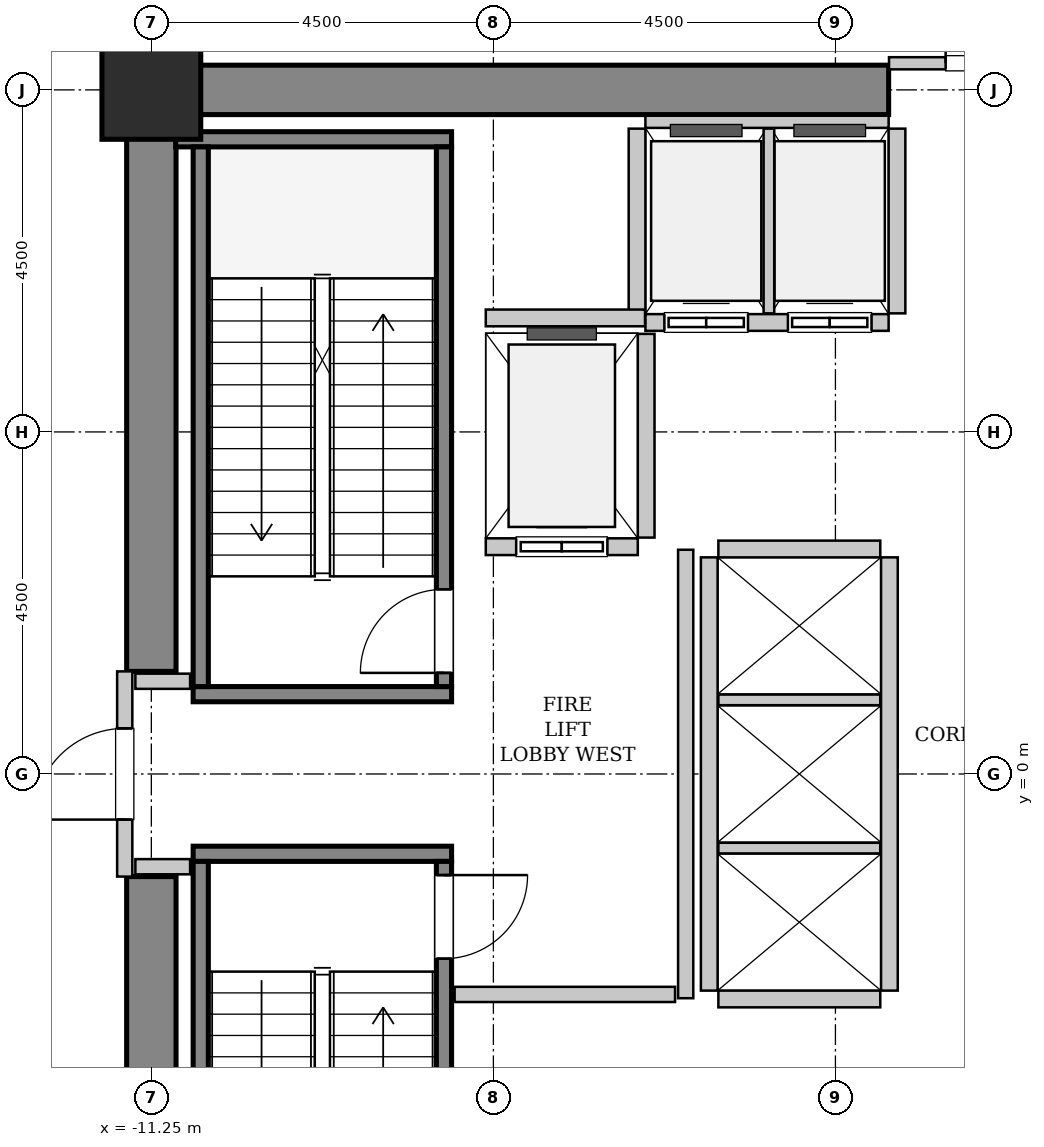
"""IFC4 building model, lengths in metres.
Left out: names, types, materials, properties, quantities, classifications, styles, units other than length and angle.
Written with IfcOpenShell. Run it as: python <this file> out.ifc"""

import sys

from ifc_helpers import new_model, si_unit, direction, frame, frame_2d, origin, origin_2d, place, context, subcontext, project, spatial, rectangle, hollow_rectangle, extrude, source, transform, mapped, element, fill, save


model = new_model("IFC4")
c1 = context("Model", 3, precision=1e-05, world=origin(), true_north=direction((0.0, 1.0)))
c2 = subcontext(c1, "Body", "Model", "MODEL_VIEW")
j1 = project(units=[si_unit("LENGTHUNIT", "METRE"), si_unit("PLANEANGLEUNIT", "RADIAN")], contexts=[c1])
p1 = place(None, origin())
s1 = spatial("IfcSite", under=j1, at=p1, CompositionType="ELEMENT")
p2 = place(p1, origin())
s2 = spatial("IfcBuilding", under=s1, at=p2, CompositionType="ELEMENT")
p3 = place(p2, frame((0.0, 0.0, 6.0)))
s3 = spatial("IfcBuildingStorey", under=s2, at=p3, CompositionType="ELEMENT", Elevation=6.0)
m1 = source(origin(), c2, "Body", "SweptSolid", [
    extrude(rectangle(XDim=10.025, YDim=0.65, at=frame_2d((5.012, 0.0))), origin(), (0.0, 0.0, 1.0), 5.4),
])
p4 = place(p3, frame((-11.575, 9.0, 0.0), z_axis=(0.0, 0.0, 1.0), x_axis=(1.0, 0.0, 0.0)))
e1 = element("IfcWall", 1, at=p4, inside=s3, PredefinedType="SHEAR", context=c2, shape_type="MappedRepresentation", body=[
    mapped(m1, transform((0.0, 0.0, 0.0), x_axis=(1.0, 0.0, 0.0), y_axis=(0.0, 1.0, 0.0), z_axis=(0.0, 0.0, 1.0), scale=1.0)),
])
m2 = source(origin(), c2, "Body", "SweptSolid", [
    extrude(rectangle(XDim=7.325, YDim=0.65, at=frame_2d((3.663, 0.0))), origin(), (0.0, 0.0, 1.0), 5.4),
])
for number, where, z_axis, x_axis in (
    (2, (-11.25, -8.675, 0.0), (0.0, 0.0, 1.0), (0.0, 1.0, 0.0)),
    (3, (-11.25, 1.35, 0.0), (0.0, 0.0, 1.0), (0.0, 1.0, 0.0)),
):
    element("IfcWall", number, at=place(p3, frame(where, z_axis=z_axis, x_axis=x_axis)), inside=s3, PredefinedType="SHEAR", context=c2, shape_type="MappedRepresentation", body=[
        mapped(m2, transform((0.0, 0.0, 0.0), x_axis=(1.0, 0.0, 0.0), y_axis=(0.0, 1.0, 0.0), z_axis=(0.0, 0.0, 1.0), scale=1.0)),
    ])
m3 = source(origin(), c2, "Body", "SweptSolid", [
    extrude(hollow_rectangle(XDim=1.3, YDim=1.3, WallThickness=0.065, InnerFilletRadius=0.065, OuterFilletRadius=0.13, at=origin_2d()), origin(), (0.0, 0.0, 1.0), 5.4),
])
p5 = place(p3, frame((-11.25, 9.0, 0.0), z_axis=(0.0, 0.0, 1.0), x_axis=(1.0, 0.0, 0.0)))
e4 = element("IfcColumn", 4, at=p5, inside=s3, PredefinedType="COLUMN", context=c2, shape_type="MappedRepresentation", body=[
    mapped(m3, transform((0.0, 0.0, 0.0), x_axis=(1.0, 0.0, 0.0), y_axis=(0.0, 1.0, 0.0), z_axis=(0.0, 0.0, 1.0), scale=1.0)),
])
m4 = source(origin(), c2, "Body", "SweptSolid", [
    extrude(rectangle(XDim=3.4, YDim=0.2, at=frame_2d((1.7, 0.0))), origin(), (0.0, 0.0, 1.0), 5.4),
])
p6 = place(p3, frame((-7.3, 1.05, 0.0), z_axis=(0.0, 0.0, 1.0), x_axis=(-1.0, 0.0, 0.0)))
e5 = element("IfcWall", 5, at=p6, inside=s3, PredefinedType="SOLIDWALL", context=c2, shape_type="MappedRepresentation", body=[
    mapped(m4, transform((0.0, 0.0, 0.0), x_axis=(1.0, 0.0, 0.0), y_axis=(0.0, 1.0, 0.0), z_axis=(0.0, 0.0, 1.0), scale=1.0)),
])
m5 = source(origin(), c2, "Body", "SweptSolid", [
    extrude(rectangle(XDim=3.63, YDim=0.2, at=frame_2d((1.815, 0.0))), origin(), (0.0, 0.0, 1.0), 5.4),
])
p7 = place(p3, frame((-7.3, 8.35, 0.0), z_axis=(0.0, 0.0, 1.0), x_axis=(-1.0, 0.0, 0.0)))
e6 = element("IfcWall", 6, at=p7, inside=s3, PredefinedType="SOLIDWALL", context=c2, shape_type="MappedRepresentation", body=[
    mapped(m5, transform((0.0, 0.0, 0.0), x_axis=(1.0, 0.0, 0.0), y_axis=(0.0, 1.0, 0.0), z_axis=(0.0, 0.0, 1.0), scale=1.0)),
])
m6 = source(origin(), c2, "Body", "SweptSolid", [
    extrude(rectangle(XDim=7.1, YDim=0.2, at=frame_2d((3.55, 0.0))), origin(), (0.0, 0.0, 1.0), 5.4),
])
p8 = place(p3, frame((-7.4, 1.15, 0.0), z_axis=(0.0, 0.0, 1.0), x_axis=(0.0, 1.0, 0.0)))
e7 = element("IfcWall", 7, at=p8, inside=s3, PredefinedType="SOLIDWALL", context=c2, shape_type="MappedRepresentation", body=[
    mapped(m6, transform((0.0, 0.0, 0.0), x_axis=(1.0, 0.0, 0.0), y_axis=(0.0, 1.0, 0.0), z_axis=(0.0, 0.0, 1.0), scale=1.0)),
])
p9 = place(p8, frame((0.18, 0.0, 0.0)))
e8 = element("IfcOpeningElement", 8, at=p9, cuts=e7, PredefinedType="OPENING", context=c2, shape_type="SweptSolid", body=[
    extrude(rectangle(XDim=1.1, YDim=2.15, at=frame_2d((0.55, 1.075))), frame((0.0, 0.11, 0.0), z_axis=(0.0, -1.0, 0.0), x_axis=(1.0, 0.0, 0.0)), (0.0, 0.0, 1.0), 0.22),
])
p10 = place(p3, frame((-10.6, 1.15, 0.0), z_axis=(0.0, 0.0, 1.0), x_axis=(0.0, 1.0, 0.0)))
e9 = element("IfcWall", 9, at=p10, inside=s3, PredefinedType="SOLIDWALL", context=c2, shape_type="MappedRepresentation", body=[
    mapped(m6, transform((0.0, 0.0, 0.0), x_axis=(1.0, 0.0, 0.0), y_axis=(0.0, 1.0, 0.0), z_axis=(0.0, 0.0, 1.0), scale=1.0)),
])
p11 = place(p3, frame((-10.7, -1.05, 0.0), z_axis=(0.0, 0.0, 1.0), x_axis=(1.0, 0.0, 0.0)))
e10 = element("IfcWall", 10, at=p11, inside=s3, PredefinedType="SOLIDWALL", context=c2, shape_type="MappedRepresentation", body=[
    mapped(m4, transform((0.0, 0.0, 0.0), x_axis=(1.0, 0.0, 0.0), y_axis=(0.0, 1.0, 0.0), z_axis=(0.0, 0.0, 1.0), scale=1.0)),
])
p12 = place(p3, frame((-10.6, -1.15, 0.0), z_axis=(0.0, 0.0, 1.0), x_axis=(0.0, -1.0, 0.0)))
e11 = element("IfcWall", 11, at=p12, inside=s3, PredefinedType="SOLIDWALL", context=c2, shape_type="MappedRepresentation", body=[
    mapped(m6, transform((0.0, 0.0, 0.0), x_axis=(1.0, 0.0, 0.0), y_axis=(0.0, 1.0, 0.0), z_axis=(0.0, 0.0, 1.0), scale=1.0)),
])
p13 = place(p3, frame((-7.4, -1.15, 0.0), z_axis=(0.0, 0.0, 1.0), x_axis=(0.0, -1.0, 0.0)))
e12 = element("IfcWall", 12, at=p13, inside=s3, PredefinedType="SOLIDWALL", context=c2, shape_type="MappedRepresentation", body=[
    mapped(m6, transform((0.0, 0.0, 0.0), x_axis=(1.0, 0.0, 0.0), y_axis=(0.0, 1.0, 0.0), z_axis=(0.0, 0.0, 1.0), scale=1.0)),
])
p14 = place(p13, frame((0.18, 0.0, 0.0)))
e13 = element("IfcOpeningElement", 13, at=p14, cuts=e12, PredefinedType="OPENING", context=c2, shape_type="SweptSolid", body=[
    extrude(rectangle(XDim=1.1, YDim=2.15, at=frame_2d((0.55, 1.075))), frame((0.0, 0.11, 0.0), z_axis=(0.0, -1.0, 0.0), x_axis=(1.0, 0.0, 0.0)), (0.0, 0.0, 1.0), 0.22),
])
m7 = source(origin(), c2, "Body", "SweptSolid", [
    extrude(rectangle(XDim=2.0, YDim=0.22, at=frame_2d((1.0, 0.0))), origin(), (0.0, 0.0, 1.0), 5.085),
])
p15 = place(p3, frame((-6.85, 2.99, 0.0), z_axis=(0.0, 0.0, 1.0), x_axis=(1.0, 0.0, 0.0)))
e14 = element("IfcWall", 14, at=p15, inside=s3, PredefinedType="SOLIDWALL", context=c2, shape_type="MappedRepresentation", body=[
    mapped(m7, transform((0.0, 0.0, 0.0), x_axis=(1.0, 0.0, 0.0), y_axis=(0.0, 1.0, 0.0), z_axis=(0.0, 0.0, 1.0), scale=1.0)),
])
p16 = place(p15, frame((0.4, 0.0, 0.0)))
e15 = element("IfcOpeningElement", 15, at=p16, cuts=e14, PredefinedType="OPENING", context=c2, shape_type="SweptSolid", body=[
    extrude(rectangle(XDim=1.2, YDim=2.2, at=frame_2d((0.6, 1.1))), frame((0.0, 0.12, 0.0), z_axis=(0.0, -1.0, 0.0), x_axis=(1.0, 0.0, 0.0)), (0.0, 0.0, 1.0), 0.24),
])
m8 = source(origin(), c2, "Body", "SweptSolid", [
    extrude(rectangle(XDim=2.68, YDim=0.22, at=frame_2d((1.34, 0.0))), origin(), (0.0, 0.0, 1.0), 5.085),
])
p17 = place(p3, frame((-4.74, 3.11, 0.0), z_axis=(0.0, 0.0, 1.0), x_axis=(0.0, 1.0, 0.0)))
e16 = element("IfcWall", 16, at=p17, inside=s3, PredefinedType="SOLIDWALL", context=c2, shape_type="MappedRepresentation", body=[
    mapped(m8, transform((0.0, 0.0, 0.0), x_axis=(1.0, 0.0, 0.0), y_axis=(0.0, 1.0, 0.0), z_axis=(0.0, 0.0, 1.0), scale=1.0)),
])
m9 = source(origin(), c2, "Body", "SweptSolid", [
    extrude(rectangle(XDim=3.2, YDim=0.22, at=frame_2d((1.6, 0.0))), origin(), (0.0, 0.0, 1.0), 5.085),
])
p18 = place(p3, frame((-4.75, 5.94, 0.0), z_axis=(0.0, 0.0, 1.0), x_axis=(1.0, 0.0, 0.0)))
e17 = element("IfcWall", 17, at=p18, inside=s3, PredefinedType="SOLIDWALL", context=c2, shape_type="MappedRepresentation", body=[
    mapped(m9, transform((0.0, 0.0, 0.0), x_axis=(1.0, 0.0, 0.0), y_axis=(0.0, 1.0, 0.0), z_axis=(0.0, 0.0, 1.0), scale=1.0)),
])
p19 = place(p18, frame((0.25, 0.0, 0.0)))
e18 = element("IfcOpeningElement", 18, at=p19, cuts=e17, PredefinedType="OPENING", context=c2, shape_type="SweptSolid", body=[
    extrude(rectangle(XDim=1.1, YDim=2.2, at=frame_2d((0.55, 1.1))), frame((0.0, 0.12, 0.0), z_axis=(0.0, -1.0, 0.0), x_axis=(1.0, 0.0, 0.0)), (0.0, 0.0, 1.0), 0.24),
])
p20 = place(p18, frame((1.875, 0.0, 0.0)))
e19 = element("IfcOpeningElement", 19, at=p20, cuts=e17, PredefinedType="OPENING", context=c2, shape_type="SweptSolid", body=[
    extrude(rectangle(XDim=1.1, YDim=2.2, at=frame_2d((0.55, 1.1))), frame((0.0, 0.12, 0.0), z_axis=(0.0, -1.0, 0.0), x_axis=(1.0, 0.0, 0.0)), (0.0, 0.0, 1.0), 0.24),
])
m10 = source(origin(), c2, "Body", "SweptSolid", [
    extrude(rectangle(XDim=3.2, YDim=0.16, at=frame_2d((1.6, 0.0))), origin(), (0.0, 0.0, 1.0), 3.975),
])
p21 = place(p3, frame((-1.55, 8.58, 0.0), z_axis=(0.0, 0.0, 1.0), x_axis=(-1.0, 0.0, 0.0)))
e20 = element("IfcWall", 20, at=p21, inside=s3, PredefinedType="PARTITIONING", context=c2, shape_type="MappedRepresentation", body=[
    mapped(m10, transform((0.0, 0.0, 0.0), x_axis=(1.0, 0.0, 0.0), y_axis=(0.0, 1.0, 0.0), z_axis=(0.0, 0.0, 1.0), scale=1.0)),
])
m11 = source(origin(), c2, "Body", "SweptSolid", [
    extrude(rectangle(XDim=2.43, YDim=0.22, at=frame_2d((1.215, 0.0))), origin(), (0.0, 0.0, 1.0), 5.085),
])
p22 = place(p3, frame((-4.86, 8.49, 0.0), z_axis=(0.0, 0.0, 1.0), x_axis=(0.0, -1.0, 0.0)))
e21 = element("IfcWall", 21, at=p22, inside=s3, PredefinedType="SOLIDWALL", context=c2, shape_type="MappedRepresentation", body=[
    mapped(m11, transform((0.0, 0.0, 0.0), x_axis=(1.0, 0.0, 0.0), y_axis=(0.0, 1.0, 0.0), z_axis=(0.0, 0.0, 1.0), scale=1.0)),
])
m12 = source(origin(), c2, "Body", "SweptSolid", [
    extrude(rectangle(XDim=2.43, YDim=0.14, at=frame_2d((1.215, 0.0))), origin(), (0.0, 0.0, 1.0), 5.085),
])
p23 = place(p3, frame((-3.125, 6.06, 0.0), z_axis=(0.0, 0.0, 1.0), x_axis=(0.0, 1.0, 0.0)))
e22 = element("IfcWall", 22, at=p23, inside=s3, PredefinedType="PARTITIONING", context=c2, shape_type="MappedRepresentation", body=[
    mapped(m12, transform((0.0, 0.0, 0.0), x_axis=(1.0, 0.0, 0.0), y_axis=(0.0, 1.0, 0.0), z_axis=(0.0, 0.0, 1.0), scale=1.0)),
])
p24 = place(p3, frame((-1.44, 6.06, 0.0), z_axis=(0.0, 0.0, 1.0), x_axis=(0.0, 1.0, 0.0)))
e23 = element("IfcWall", 23, at=p24, inside=s3, PredefinedType="SOLIDWALL", context=c2, shape_type="MappedRepresentation", body=[
    mapped(m11, transform((0.0, 0.0, 0.0), x_axis=(1.0, 0.0, 0.0), y_axis=(0.0, 1.0, 0.0), z_axis=(0.0, 0.0, 1.0), scale=1.0)),
])
m13 = source(origin(), c2, "Body", "SweptSolid", [
    extrude(rectangle(XDim=5.7, YDim=0.22, at=frame_2d((2.85, 0.0))), origin(), (0.0, 0.0, 1.0), 5.085),
])
for number, where, z_axis, x_axis in (
    (24, (-1.54, -2.85, 0.0), (0.0, 0.0, 1.0), (0.0, 1.0, 0.0)),
    (25, (-3.91, 2.85, 0.0), (0.0, 0.0, 1.0), (0.0, -1.0, 0.0)),
):
    element("IfcWall", number, at=place(p3, frame(where, z_axis=z_axis, x_axis=x_axis)), inside=s3, PredefinedType="SOLIDWALL", context=c2, shape_type="MappedRepresentation", body=[
        mapped(m13, transform((0.0, 0.0, 0.0), x_axis=(1.0, 0.0, 0.0), y_axis=(0.0, 1.0, 0.0), z_axis=(0.0, 0.0, 1.0), scale=1.0)),
    ])
m14 = source(origin(), c2, "Body", "SweptSolid", [
    extrude(rectangle(XDim=2.13, YDim=0.22, at=frame_2d((1.065, 0.0))), origin(), (0.0, 0.0, 1.0), 5.085),
])
p25 = place(p3, frame((-3.79, -2.96, 0.0), z_axis=(0.0, 0.0, 1.0), x_axis=(1.0, 0.0, 0.0)))
e26 = element("IfcWall", 26, at=p25, inside=s3, PredefinedType="SOLIDWALL", context=c2, shape_type="MappedRepresentation", body=[
    mapped(m14, transform((0.0, 0.0, 0.0), x_axis=(1.0, 0.0, 0.0), y_axis=(0.0, 1.0, 0.0), z_axis=(0.0, 0.0, 1.0), scale=1.0)),
])
m15 = source(origin(), c2, "Body", "SweptSolid", [
    extrude(rectangle(XDim=2.13, YDim=0.14, at=frame_2d((1.065, 0.0))), origin(), (0.0, 0.0, 1.0), 5.085),
])
for number, where, z_axis, x_axis in (
    (27, (-3.79, -0.975, 0.0), (0.0, 0.0, 1.0), (1.0, 0.0, 0.0)),
    (28, (-3.79, 0.975, 0.0), (0.0, 0.0, 1.0), (1.0, 0.0, 0.0)),
):
    element("IfcWall", number, at=place(p3, frame(where, z_axis=z_axis, x_axis=x_axis)), inside=s3, PredefinedType="PARTITIONING", context=c2, shape_type="MappedRepresentation", body=[
        mapped(m15, transform((0.0, 0.0, 0.0), x_axis=(1.0, 0.0, 0.0), y_axis=(0.0, 1.0, 0.0), z_axis=(0.0, 0.0, 1.0), scale=1.0)),
    ])
p26 = place(p3, frame((-1.66, 2.96, 0.0), z_axis=(0.0, 0.0, 1.0), x_axis=(-1.0, 0.0, 0.0)))
e29 = element("IfcWall", 29, at=p26, inside=s3, PredefinedType="SOLIDWALL", context=c2, shape_type="MappedRepresentation", body=[
    mapped(m14, transform((0.0, 0.0, 0.0), x_axis=(1.0, 0.0, 0.0), y_axis=(0.0, 1.0, 0.0), z_axis=(0.0, 0.0, 1.0), scale=1.0)),
])
m16 = source(origin(), c2, "Body", "SweptSolid", [
    extrude(rectangle(XDim=2.095, YDim=0.22, at=frame_2d((1.048, 0.0))), origin(), (0.0, 0.0, 1.0), 5.085),
])
p27 = place(p3, frame((-6.85, 6.0, 0.0), z_axis=(0.0, 0.0, 1.0), x_axis=(1.0, 0.0, 0.0)))
e30 = element("IfcWall", 30, at=p27, inside=s3, PredefinedType="SOLIDWALL", context=c2, shape_type="MappedRepresentation", body=[
    mapped(m16, transform((0.0, 0.0, 0.0), x_axis=(1.0, 0.0, 0.0), y_axis=(0.0, 1.0, 0.0), z_axis=(0.0, 0.0, 1.0), scale=1.0)),
])
m17 = source(origin(), c2, "Body", "SweptSolid", [
    extrude(rectangle(XDim=2.7, YDim=0.2, at=frame_2d((1.35, 0.0))), origin(), (0.0, 0.0, 1.0), 3.975),
])
p28 = place(p3, frame((-11.6, -1.35, 0.0), z_axis=(0.0, 0.0, 1.0), x_axis=(0.0, 1.0, 0.0)))
e31 = element("IfcWall", 31, at=p28, inside=s3, PredefinedType="PARTITIONING", context=c2, shape_type="MappedRepresentation", body=[
    mapped(m17, transform((0.0, 0.0, 0.0), x_axis=(1.0, 0.0, 0.0), y_axis=(0.0, 1.0, 0.0), z_axis=(0.0, 0.0, 1.0), scale=1.0)),
])
p29 = place(p28, frame((0.75, 0.0, 0.0)))
e32 = element("IfcOpeningElement", 32, at=p29, cuts=e31, PredefinedType="OPENING", context=c2, shape_type="SweptSolid", body=[
    extrude(rectangle(XDim=1.2, YDim=2.15, at=frame_2d((0.6, 1.075))), frame((0.0, 0.11, 0.0), z_axis=(0.0, -1.0, 0.0), x_axis=(1.0, 0.0, 0.0)), (0.0, 0.0, 1.0), 0.22),
])
m18 = source(origin(), c2, "Body", "SweptSolid", [
    extrude(rectangle(XDim=5.9, YDim=0.2, at=frame_2d((2.95, 0.0))), origin(), (0.0, 0.0, 1.0), 5.085),
])
p30 = place(p3, frame((-4.22, -2.95, 0.0), z_axis=(0.0, 0.0, 1.0), x_axis=(0.0, 1.0, 0.0)))
e33 = element("IfcWall", 33, at=p30, inside=s3, PredefinedType="PARTITIONING", context=c2, shape_type="MappedRepresentation", body=[
    mapped(m18, transform((0.0, 0.0, 0.0), x_axis=(1.0, 0.0, 0.0), y_axis=(0.0, 1.0, 0.0), z_axis=(0.0, 0.0, 1.0), scale=1.0)),
])
m19 = source(origin(), c2, "Body", "SweptSolid", [
    extrude(rectangle(XDim=2.9, YDim=0.2, at=frame_2d((1.45, 0.0))), origin(), (0.0, 0.0, 1.0), 5.085),
])
p31 = place(p3, frame((-7.26, -2.9, 0.0), z_axis=(0.0, 0.0, 1.0), x_axis=(1.0, 0.0, 0.0)))
e34 = element("IfcWall", 34, at=p31, inside=s3, PredefinedType="PARTITIONING", context=c2, shape_type="MappedRepresentation", body=[
    mapped(m19, transform((0.0, 0.0, 0.0), x_axis=(1.0, 0.0, 0.0), y_axis=(0.0, 1.0, 0.0), z_axis=(0.0, 0.0, 1.0), scale=1.0)),
])
m20 = source(origin(), c2, "Body", "SweptSolid", [
    extrude(rectangle(XDim=0.72, YDim=0.2, at=frame_2d((0.36, 0.0))), origin(), (0.0, 0.0, 1.0), 5.085),
])
for number, where, z_axis, x_axis in (
    (35, (-11.46, 1.22, 0.0), (0.0, 0.0, 1.0), (1.0, 0.0, 0.0)),
    (36, (-11.46, -1.22, 0.0), (0.0, 0.0, 1.0), (1.0, 0.0, 0.0)),
):
    element("IfcWall", number, at=place(p3, frame(where, z_axis=z_axis, x_axis=x_axis)), inside=s3, PredefinedType="PARTITIONING", context=c2, shape_type="MappedRepresentation", body=[
        mapped(m20, transform((0.0, 0.0, 0.0), x_axis=(1.0, 0.0, 0.0), y_axis=(0.0, 1.0, 0.0), z_axis=(0.0, 0.0, 1.0), scale=1.0)),
    ])
m21 = source(origin(), c2, "Body", "SweptSolid", [
    extrude(rectangle(XDim=3.09, YDim=0.16, at=frame_2d((1.545, 0.0))), origin(), (0.0, 0.0, 1.0), 3.975),
])
p32 = place(p3, frame((-1.545, 9.35, 0.0), z_axis=(0.0, 0.0, 1.0), x_axis=(1.0, 0.0, 0.0)))
e37 = element("IfcWall", 37, at=p32, inside=s3, PredefinedType="PARTITIONING", context=c2, shape_type="MappedRepresentation", body=[
    mapped(m21, transform((0.0, 0.0, 0.0), x_axis=(1.0, 0.0, 0.0), y_axis=(0.0, 1.0, 0.0), z_axis=(0.0, 0.0, 1.0), scale=1.0)),
])
p33 = place(p32, frame((0.745, 0.0, 0.0)))
e38 = element("IfcOpeningElement", 38, at=p33, cuts=e37, PredefinedType="OPENING", context=c2, shape_type="SweptSolid", body=[
    extrude(rectangle(XDim=1.6, YDim=2.3, at=frame_2d((0.8, 1.15))), frame((0.0, 0.09, 0.0), z_axis=(0.0, -1.0, 0.0), x_axis=(1.0, 0.0, 0.0)), (0.0, 0.0, 1.0), 0.18),
])
m22 = source(origin(), c2, "Body", "SweptSolid", [
    extrude(rectangle(XDim=1.1, YDim=2.15, at=frame_2d((0.55, 1.075))), frame((0.0, 0.025, 0.0), z_axis=(0.0, -1.0, 0.0), x_axis=(1.0, 0.0, 0.0)), (0.0, 0.0, 1.0), 0.05),
])
p34 = place(p9, origin())
e39 = element("IfcDoor", 39, at=p34, inside=s3, OperationType="SINGLE_SWING_LEFT", PredefinedType="DOOR", context=c2, shape_type="MappedRepresentation", body=[
    mapped(m22, transform((0.0, 0.0, 0.0), x_axis=(1.0, 0.0, 0.0), y_axis=(0.0, 1.0, 0.0), z_axis=(0.0, 0.0, 1.0), scale=1.0)),
])
fill(e8, e39)
p35 = place(p14, origin())
e40 = element("IfcDoor", 40, at=p35, inside=s3, OperationType="SINGLE_SWING_LEFT", PredefinedType="DOOR", context=c2, shape_type="MappedRepresentation", body=[
    mapped(m22, transform((0.0, 0.0, 0.0), x_axis=(1.0, 0.0, 0.0), y_axis=(0.0, 1.0, 0.0), z_axis=(0.0, 0.0, 1.0), scale=1.0)),
])
fill(e13, e40)
m23 = source(origin(), c2, "Body", "SweptSolid", [
    extrude(rectangle(XDim=1.2, YDim=2.2, at=frame_2d((0.6, 1.1))), frame((0.0, 0.025, 0.0), z_axis=(0.0, -1.0, 0.0), x_axis=(1.0, 0.0, 0.0)), (0.0, 0.0, 1.0), 0.05),
])
p36 = place(p16, origin())
e41 = element("IfcDoor", 41, at=p36, inside=s3, OperationType="SLIDING_TO_LEFT", PredefinedType="DOOR", context=c2, shape_type="MappedRepresentation", body=[
    mapped(m23, transform((0.0, 0.0, 0.0), x_axis=(1.0, 0.0, 0.0), y_axis=(0.0, 1.0, 0.0), z_axis=(0.0, 0.0, 1.0), scale=1.0)),
])
fill(e15, e41)
m24 = source(origin(), c2, "Body", "SweptSolid", [
    extrude(rectangle(XDim=1.1, YDim=2.2, at=frame_2d((0.55, 1.1))), frame((0.0, 0.025, 0.0), z_axis=(0.0, -1.0, 0.0), x_axis=(1.0, 0.0, 0.0)), (0.0, 0.0, 1.0), 0.05),
])
p37 = place(p19, origin())
e42 = element("IfcDoor", 42, at=p37, inside=s3, OperationType="DOUBLE_DOOR_SLIDING", PredefinedType="DOOR", context=c2, shape_type="MappedRepresentation", body=[
    mapped(m24, transform((0.0, 0.0, 0.0), x_axis=(1.0, 0.0, 0.0), y_axis=(0.0, 1.0, 0.0), z_axis=(0.0, 0.0, 1.0), scale=1.0)),
])
fill(e18, e42)
p38 = place(p20, origin())
e43 = element("IfcDoor", 43, at=p38, inside=s3, OperationType="DOUBLE_DOOR_SLIDING", PredefinedType="DOOR", context=c2, shape_type="MappedRepresentation", body=[
    mapped(m24, transform((0.0, 0.0, 0.0), x_axis=(1.0, 0.0, 0.0), y_axis=(0.0, 1.0, 0.0), z_axis=(0.0, 0.0, 1.0), scale=1.0)),
])
fill(e19, e43)
m25 = source(origin(), c2, "Body", "SweptSolid", [
    extrude(rectangle(XDim=1.2, YDim=2.15, at=frame_2d((0.6, 1.075))), frame((0.0, 0.025, 0.0), z_axis=(0.0, -1.0, 0.0), x_axis=(1.0, 0.0, 0.0)), (0.0, 0.0, 1.0), 0.05),
])
p39 = place(p29, origin())
e44 = element("IfcDoor", 44, at=p39, inside=s3, OperationType="SINGLE_SWING_LEFT", PredefinedType="DOOR", context=c2, shape_type="MappedRepresentation", body=[
    mapped(m25, transform((0.0, 0.0, 0.0), x_axis=(1.0, 0.0, 0.0), y_axis=(0.0, 1.0, 0.0), z_axis=(0.0, 0.0, 1.0), scale=1.0)),
])
fill(e32, e44)
m26 = source(origin(), c2, "Body", "SweptSolid", [
    extrude(rectangle(XDim=1.6, YDim=2.3, at=frame_2d((0.8, 1.15))), frame((0.0, 0.025, 0.0), z_axis=(0.0, -1.0, 0.0), x_axis=(1.0, 0.0, 0.0)), (0.0, 0.0, 1.0), 0.05),
])
p40 = place(p33, origin())
e45 = element("IfcDoor", 45, at=p40, inside=s3, OperationType="DOUBLE_DOOR_SINGLE_SWING", PredefinedType="DOOR", context=c2, shape_type="MappedRepresentation", body=[
    mapped(m26, transform((0.0, 0.0, 0.0), x_axis=(1.0, 0.0, 0.0), y_axis=(0.0, 1.0, 0.0), z_axis=(0.0, 0.0, 1.0), scale=1.0)),
])
fill(e38, e45)
save(model, sys.argv[1])
